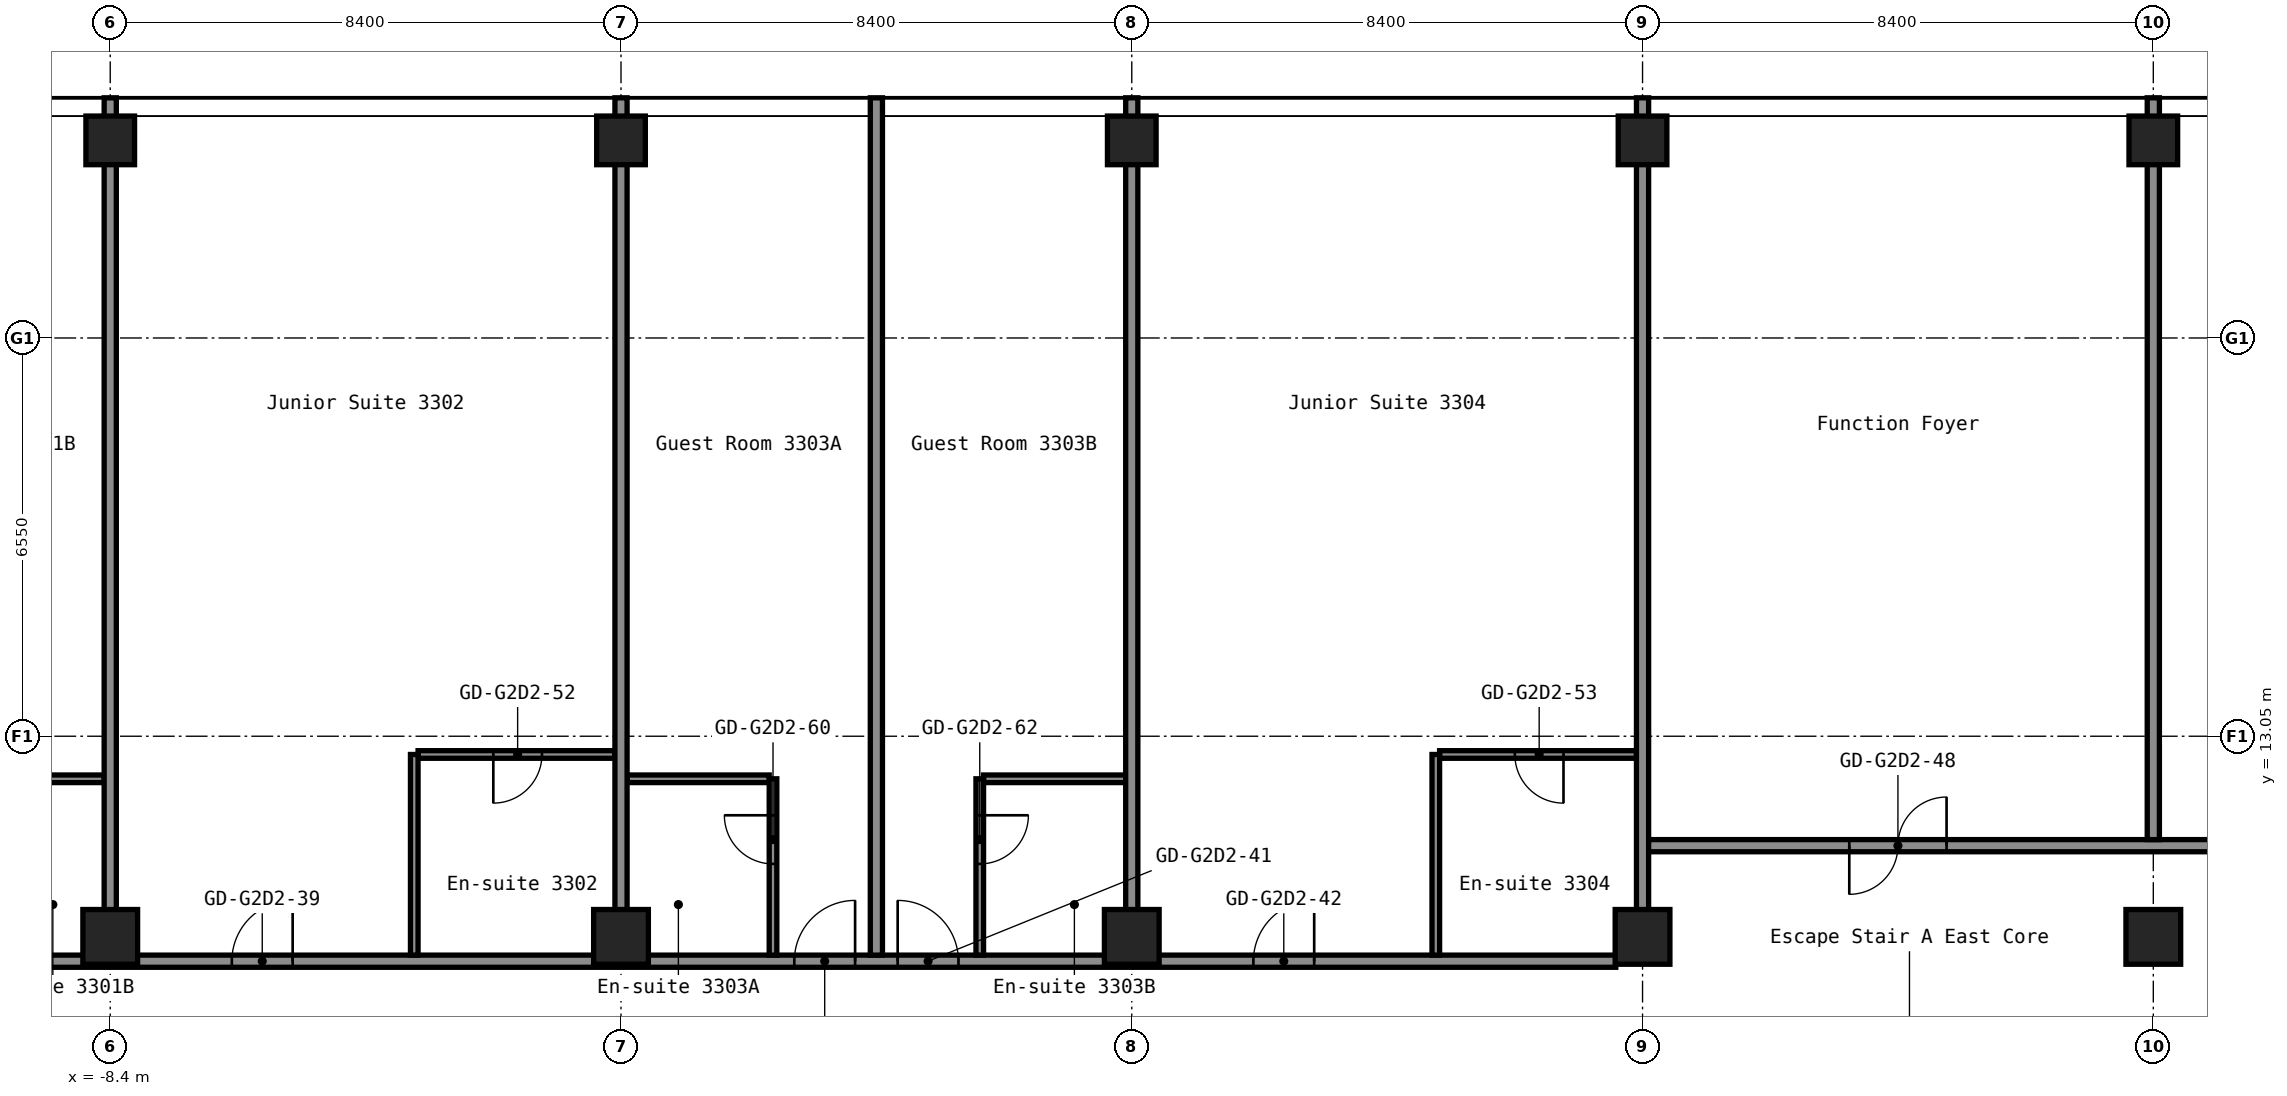
"""IFC4 building model, lengths in metres.
Left out: names, types, materials, properties, quantities, classifications, styles, units other than length and angle.
Written with IfcOpenShell. Run it as: python <this file> out.ifc"""

import sys

from ifc_helpers import new_model, si_unit, direction, frame, frame_2d, origin, origin_2d, place, context, subcontext, project, spatial, rectangle, hollow_rectangle, extrude, element, fill, save


model = new_model("IFC4")
c1 = context("Model", 3, precision=1e-05, world=origin(), true_north=direction((0.0, 1.0)))
c2 = subcontext(c1, "Body", "Model", "MODEL_VIEW")
j1 = project(units=[si_unit("LENGTHUNIT", "METRE"), si_unit("PLANEANGLEUNIT", "RADIAN")], contexts=[c1])
p1 = place(None, origin())
s1 = spatial("IfcSite", under=j1, at=p1, CompositionType="ELEMENT")
p2 = place(p1, origin())
s2 = spatial("IfcBuilding", under=s1, at=p2, CompositionType="ELEMENT")
p3 = place(p2, frame((0.0, 0.0, 117.0)))
s3 = spatial("IfcBuildingStorey", under=s2, at=p3, CompositionType="ELEMENT", Elevation=117.0)
p4 = place(p3, frame((-8.4, 9.75, 0.0), z_axis=(0.0, 0.0, 1.0), x_axis=(1.0, 0.0, 0.0)))
e1 = element("IfcColumn", 1, at=p4, inside=s3, PredefinedType="COLUMN", context=c2, shape_type="SweptSolid", body=[
    extrude(hollow_rectangle(XDim=0.9, YDim=0.9, WallThickness=0.036, at=origin_2d()), origin(), (0.0, 0.0, 1.0), 2.9),
])
p5 = place(p3, frame((-8.4, 22.85, 0.0), z_axis=(0.0, 0.0, 1.0), x_axis=(1.0, 0.0, 0.0)))
e2 = element("IfcColumn", 2, at=p5, inside=s3, PredefinedType="COLUMN", context=c2, shape_type="SweptSolid", body=[
    extrude(hollow_rectangle(XDim=0.8, YDim=0.8, WallThickness=0.032, at=origin_2d()), origin(), (0.0, 0.0, 1.0), 2.9),
])
p6 = place(p3, frame((0.0, 9.75, 0.0), z_axis=(0.0, 0.0, 1.0), x_axis=(1.0, 0.0, 0.0)))
e3 = element("IfcColumn", 3, at=p6, inside=s3, PredefinedType="COLUMN", context=c2, shape_type="SweptSolid", body=[
    extrude(hollow_rectangle(XDim=0.9, YDim=0.9, WallThickness=0.036, at=origin_2d()), origin(), (0.0, 0.0, 1.0), 2.9),
])
p7 = place(p3, frame((0.0, 22.85, 0.0), z_axis=(0.0, 0.0, 1.0), x_axis=(1.0, 0.0, 0.0)))
e4 = element("IfcColumn", 4, at=p7, inside=s3, PredefinedType="COLUMN", context=c2, shape_type="SweptSolid", body=[
    extrude(hollow_rectangle(XDim=0.8, YDim=0.8, WallThickness=0.032, at=origin_2d()), origin(), (0.0, 0.0, 1.0), 2.9),
])
p8 = place(p3, frame((8.4, 9.75, 0.0), z_axis=(0.0, 0.0, 1.0), x_axis=(1.0, 0.0, 0.0)))
e5 = element("IfcColumn", 5, at=p8, inside=s3, PredefinedType="COLUMN", context=c2, shape_type="SweptSolid", body=[
    extrude(hollow_rectangle(XDim=0.9, YDim=0.9, WallThickness=0.036, at=origin_2d()), origin(), (0.0, 0.0, 1.0), 2.9),
])
p9 = place(p3, frame((8.4, 22.85, 0.0), z_axis=(0.0, 0.0, 1.0), x_axis=(1.0, 0.0, 0.0)))
e6 = element("IfcColumn", 6, at=p9, inside=s3, PredefinedType="COLUMN", context=c2, shape_type="SweptSolid", body=[
    extrude(hollow_rectangle(XDim=0.8, YDim=0.8, WallThickness=0.032, at=origin_2d()), origin(), (0.0, 0.0, 1.0), 2.9),
])
p10 = place(p3, frame((16.8, 9.75, 0.0), z_axis=(0.0, 0.0, 1.0), x_axis=(1.0, 0.0, 0.0)))
e7 = element("IfcColumn", 7, at=p10, inside=s3, PredefinedType="COLUMN", context=c2, shape_type="SweptSolid", body=[
    extrude(hollow_rectangle(XDim=0.9, YDim=0.9, WallThickness=0.036, at=origin_2d()), origin(), (0.0, 0.0, 1.0), 2.9),
])
p11 = place(p3, frame((16.8, 22.85, 0.0), z_axis=(0.0, 0.0, 1.0), x_axis=(1.0, 0.0, 0.0)))
e8 = element("IfcColumn", 8, at=p11, inside=s3, PredefinedType="COLUMN", context=c2, shape_type="SweptSolid", body=[
    extrude(hollow_rectangle(XDim=0.8, YDim=0.8, WallThickness=0.032, at=origin_2d()), origin(), (0.0, 0.0, 1.0), 2.9),
])
p12 = place(p3, frame((25.2, 9.75, 0.0), z_axis=(0.0, 0.0, 1.0), x_axis=(1.0, 0.0, 0.0)))
e9 = element("IfcColumn", 9, at=p12, inside=s3, PredefinedType="COLUMN", context=c2, shape_type="SweptSolid", body=[
    extrude(hollow_rectangle(XDim=0.9, YDim=0.9, WallThickness=0.036, at=origin_2d()), origin(), (0.0, 0.0, 1.0), 2.9),
])
p13 = place(p3, frame((25.2, 22.85, 0.0), z_axis=(0.0, 0.0, 1.0), x_axis=(1.0, 0.0, 0.0)))
e10 = element("IfcColumn", 10, at=p13, inside=s3, PredefinedType="COLUMN", context=c2, shape_type="SweptSolid", body=[
    extrude(hollow_rectangle(XDim=0.8, YDim=0.8, WallThickness=0.032, at=origin_2d()), origin(), (0.0, 0.0, 1.0), 2.9),
])
p14 = place(p3, frame((-16.36, 9.35, 0.0), z_axis=(0.0, 0.0, 1.0), x_axis=(1.0, 0.0, 0.0)))
e11 = element("IfcWall", 11, at=p14, inside=s3, PredefinedType="PARTITIONING", context=c2, shape_type="SweptSolid", body=[
    extrude(rectangle(XDim=32.72, YDim=0.2, at=frame_2d((16.36, 0.0))), origin(), (0.0, 0.0, 1.0), 2.9),
])
p15 = place(p14, frame((2.41, 0.0, 0.0)))
e12 = element("IfcOpeningElement", 12, at=p15, cuts=e11, PredefinedType="OPENING", context=c2, shape_type="SweptSolid", body=[
    extrude(rectangle(XDim=1.0, YDim=2.1, at=frame_2d((0.5, 1.05))), frame((0.0, 0.11, 0.0), z_axis=(0.0, -1.0, 0.0), x_axis=(1.0, 0.0, 0.0)), (0.0, 0.0, 1.0), 0.22),
])
p16 = place(p14, frame((4.11, 0.0, 0.0)))
e13 = element("IfcOpeningElement", 13, at=p16, cuts=e11, PredefinedType="OPENING", context=c2, shape_type="SweptSolid", body=[
    extrude(rectangle(XDim=1.0, YDim=2.1, at=frame_2d((0.5, 1.05))), frame((0.0, 0.11, 0.0), z_axis=(0.0, -1.0, 0.0), x_axis=(1.0, 0.0, 0.0)), (0.0, 0.0, 1.0), 0.22),
])
p17 = place(p14, frame((9.96, 0.0, 0.0)))
e14 = element("IfcOpeningElement", 14, at=p17, cuts=e11, PredefinedType="OPENING", context=c2, shape_type="SweptSolid", body=[
    extrude(rectangle(XDim=1.0, YDim=2.1, at=frame_2d((0.5, 1.05))), frame((0.0, 0.11, 0.0), z_axis=(0.0, -1.0, 0.0), x_axis=(1.0, 0.0, 0.0)), (0.0, 0.0, 1.0), 0.22),
])
p18 = place(p14, frame((19.21, 0.0, 0.0)))
e15 = element("IfcOpeningElement", 15, at=p18, cuts=e11, PredefinedType="OPENING", context=c2, shape_type="SweptSolid", body=[
    extrude(rectangle(XDim=1.0, YDim=2.1, at=frame_2d((0.5, 1.05))), frame((0.0, 0.11, 0.0), z_axis=(0.0, -1.0, 0.0), x_axis=(1.0, 0.0, 0.0)), (0.0, 0.0, 1.0), 0.22),
])
p19 = place(p14, frame((20.91, 0.0, 0.0)))
e16 = element("IfcOpeningElement", 16, at=p19, cuts=e11, PredefinedType="OPENING", context=c2, shape_type="SweptSolid", body=[
    extrude(rectangle(XDim=1.0, YDim=2.1, at=frame_2d((0.5, 1.05))), frame((0.0, 0.11, 0.0), z_axis=(0.0, -1.0, 0.0), x_axis=(1.0, 0.0, 0.0)), (0.0, 0.0, 1.0), 0.22),
])
p20 = place(p14, frame((26.76, 0.0, 0.0)))
e17 = element("IfcOpeningElement", 17, at=p20, cuts=e11, PredefinedType="OPENING", context=c2, shape_type="SweptSolid", body=[
    extrude(rectangle(XDim=1.0, YDim=2.1, at=frame_2d((0.5, 1.05))), frame((0.0, 0.11, 0.0), z_axis=(0.0, -1.0, 0.0), x_axis=(1.0, 0.0, 0.0)), (0.0, 0.0, 1.0), 0.22),
])
p21 = place(p3, frame((16.8, 11.25, 0.0), z_axis=(0.0, 0.0, 1.0), x_axis=(1.0, 0.0, 0.0)))
e18 = element("IfcWall", 18, at=p21, inside=s3, PredefinedType="PARTITIONING", context=c2, shape_type="SweptSolid", body=[
    extrude(rectangle(XDim=29.7, YDim=0.2, at=frame_2d((14.85, 0.0))), origin(), (0.0, 0.0, 1.0), 2.9),
])
p22 = place(p21, frame((3.4, 0.0, 0.0)))
e19 = element("IfcOpeningElement", 19, at=p22, cuts=e18, PredefinedType="OPENING", context=c2, shape_type="SweptSolid", body=[
    extrude(rectangle(XDim=1.6, YDim=2.1, at=frame_2d((0.8, 1.05))), frame((0.0, 0.11, 0.0), z_axis=(0.0, -1.0, 0.0), x_axis=(1.0, 0.0, 0.0)), (0.0, 0.0, 1.0), 0.22),
])
p23 = place(p21, frame((11.8, 0.0, 0.0)))
e20 = element("IfcOpeningElement", 20, at=p23, cuts=e18, PredefinedType="OPENING", context=c2, shape_type="SweptSolid", body=[
    extrude(rectangle(XDim=1.6, YDim=2.1, at=frame_2d((0.8, 1.05))), frame((0.0, 0.11, 0.0), z_axis=(0.0, -1.0, 0.0), x_axis=(1.0, 0.0, 0.0)), (0.0, 0.0, 1.0), 0.22),
])
p24 = place(p21, frame((20.2, 0.0, 0.0)))
e21 = element("IfcOpeningElement", 21, at=p24, cuts=e18, PredefinedType="OPENING", context=c2, shape_type="SweptSolid", body=[
    extrude(rectangle(XDim=1.6, YDim=2.1, at=frame_2d((0.8, 1.05))), frame((0.0, 0.11, 0.0), z_axis=(0.0, -1.0, 0.0), x_axis=(1.0, 0.0, 0.0)), (0.0, 0.0, 1.0), 0.22),
])
p25 = place(p21, frame((26.85, 0.0, 0.0)))
e22 = element("IfcOpeningElement", 22, at=p25, cuts=e18, PredefinedType="OPENING", context=c2, shape_type="SweptSolid", body=[
    extrude(rectangle(XDim=0.9, YDim=2.1, at=frame_2d((0.45, 1.05))), frame((0.0, 0.11, 0.0), z_axis=(0.0, -1.0, 0.0), x_axis=(1.0, 0.0, 0.0)), (0.0, 0.0, 1.0), 0.22),
])
for number, where, z_axis, x_axis in (
    (23, (-10.837, 12.35, 0.0), (0.0, 0.0, 1.0), (1.0, 0.0, 0.0)),
    (24, (0.1, 12.35, 0.0), (0.0, 0.0, 1.0), (1.0, 0.0, 0.0)),
):
    element("IfcWall", number, at=place(p3, frame(where, z_axis=z_axis, x_axis=x_axis)), inside=s3, PredefinedType="PARTITIONING", context=c2, shape_type="SweptSolid", body=[
        extrude(rectangle(XDim=2.337, YDim=0.125, at=frame_2d((1.169, 0.0))), origin(), (0.0, 0.0, 1.0), 2.9),
    ])
p26 = place(p3, frame((5.962, 12.35, 0.0), z_axis=(0.0, 0.0, 1.0), x_axis=(1.0, 0.0, 0.0)))
e25 = element("IfcWall", 25, at=p26, inside=s3, PredefinedType="PARTITIONING", context=c2, shape_type="SweptSolid", body=[
    extrude(rectangle(XDim=2.338, YDim=0.125, at=frame_2d((1.169, 0.0))), origin(), (0.0, 0.0, 1.0), 2.9),
])
p27 = place(p3, frame((-3.337, 12.75, 0.0), z_axis=(0.0, 0.0, 1.0), x_axis=(1.0, 0.0, 0.0)))
e26 = element("IfcWall", 26, at=p27, inside=s3, PredefinedType="PARTITIONING", context=c2, shape_type="SweptSolid", body=[
    extrude(rectangle(XDim=3.237, YDim=0.125, at=frame_2d((1.619, 0.0))), origin(), (0.0, 0.0, 1.0), 2.9),
])
p28 = place(p27, frame((1.238, 0.0, 0.0)))
e27 = element("IfcOpeningElement", 27, at=p28, cuts=e26, PredefinedType="OPENING", context=c2, shape_type="SweptSolid", body=[
    extrude(rectangle(XDim=0.8, YDim=2.1, at=frame_2d((0.4, 1.05))), frame((0.0, 0.073, 0.0), z_axis=(0.0, -1.0, 0.0), x_axis=(1.0, 0.0, 0.0)), (0.0, 0.0, 1.0), 0.145),
])
p29 = place(p3, frame((13.462, 12.75, 0.0), z_axis=(0.0, 0.0, 1.0), x_axis=(1.0, 0.0, 0.0)))
e28 = element("IfcWall", 28, at=p29, inside=s3, PredefinedType="PARTITIONING", context=c2, shape_type="SweptSolid", body=[
    extrude(rectangle(XDim=3.238, YDim=0.125, at=frame_2d((1.619, 0.0))), origin(), (0.0, 0.0, 1.0), 2.9),
])
p30 = place(p29, frame((1.238, 0.0, 0.0)))
e29 = element("IfcOpeningElement", 29, at=p30, cuts=e28, PredefinedType="OPENING", context=c2, shape_type="SweptSolid", body=[
    extrude(rectangle(XDim=0.8, YDim=2.1, at=frame_2d((0.4, 1.05))), frame((0.0, 0.073, 0.0), z_axis=(0.0, -1.0, 0.0), x_axis=(1.0, 0.0, 0.0)), (0.0, 0.0, 1.0), 0.145),
])
p31 = place(p3, frame((-8.4, 10.19, 0.0), z_axis=(0.0, 0.0, 1.0), x_axis=(0.0, 1.0, 0.0)))
e30 = element("IfcWall", 30, at=p31, inside=s3, PredefinedType="PARTITIONING", context=c2, shape_type="SweptSolid", body=[
    extrude(rectangle(XDim=13.36, YDim=0.2, at=frame_2d((6.68, 0.0))), origin(), (0.0, 0.0, 1.0), 2.9),
])
p32 = place(p3, frame((-3.4, 9.45, 0.0), z_axis=(0.0, 0.0, 1.0), x_axis=(0.0, 1.0, 0.0)))
e31 = element("IfcWall", 31, at=p32, inside=s3, PredefinedType="PARTITIONING", context=c2, shape_type="SweptSolid", body=[
    extrude(rectangle(XDim=3.3, YDim=0.125, at=frame_2d((1.65, 0.0))), origin(), (0.0, 0.0, 1.0), 2.9),
])
p33 = place(p3, frame((0.0, 10.19, 0.0), z_axis=(0.0, 0.0, 1.0), x_axis=(0.0, 1.0, 0.0)))
e32 = element("IfcWall", 32, at=p33, inside=s3, PredefinedType="PARTITIONING", context=c2, shape_type="SweptSolid", body=[
    extrude(rectangle(XDim=13.36, YDim=0.2, at=frame_2d((6.68, 0.0))), origin(), (0.0, 0.0, 1.0), 2.9),
])
p34 = place(p3, frame((2.5, 9.45, 0.0), z_axis=(0.0, 0.0, 1.0), x_axis=(0.0, 1.0, 0.0)))
e33 = element("IfcWall", 33, at=p34, inside=s3, PredefinedType="PARTITIONING", context=c2, shape_type="SweptSolid", body=[
    extrude(rectangle(XDim=2.9, YDim=0.125, at=frame_2d((1.45, 0.0))), origin(), (0.0, 0.0, 1.0), 2.9),
])
p35 = place(p34, frame((1.5, 0.0, 0.0)))
e34 = element("IfcOpeningElement", 34, at=p35, cuts=e33, PredefinedType="OPENING", context=c2, shape_type="SweptSolid", body=[
    extrude(rectangle(XDim=0.8, YDim=2.1, at=frame_2d((0.4, 1.05))), frame((0.0, 0.073, 0.0), z_axis=(0.0, -1.0, 0.0), x_axis=(1.0, 0.0, 0.0)), (0.0, 0.0, 1.0), 0.145),
])
p36 = place(p3, frame((4.2, 9.45, 0.0), z_axis=(0.0, 0.0, 1.0), x_axis=(0.0, 1.0, 0.0)))
e35 = element("IfcWall", 35, at=p36, inside=s3, PredefinedType="PARTITIONING", context=c2, shape_type="SweptSolid", body=[
    extrude(rectangle(XDim=14.1, YDim=0.2, at=frame_2d((7.05, 0.0))), origin(), (0.0, 0.0, 1.0), 2.9),
])
p37 = place(p3, frame((5.9, 9.45, 0.0), z_axis=(0.0, 0.0, 1.0), x_axis=(0.0, 1.0, 0.0)))
e36 = element("IfcWall", 36, at=p37, inside=s3, PredefinedType="PARTITIONING", context=c2, shape_type="SweptSolid", body=[
    extrude(rectangle(XDim=2.9, YDim=0.125, at=frame_2d((1.45, 0.0))), origin(), (0.0, 0.0, 1.0), 2.9),
])
p38 = place(p37, frame((1.5, 0.0, 0.0)))
e37 = element("IfcOpeningElement", 37, at=p38, cuts=e36, PredefinedType="OPENING", context=c2, shape_type="SweptSolid", body=[
    extrude(rectangle(XDim=0.8, YDim=2.1, at=frame_2d((0.4, 1.05))), frame((0.0, 0.073, 0.0), z_axis=(0.0, -1.0, 0.0), x_axis=(1.0, 0.0, 0.0)), (0.0, 0.0, 1.0), 0.145),
])
p39 = place(p3, frame((8.4, 10.19, 0.0), z_axis=(0.0, 0.0, 1.0), x_axis=(0.0, 1.0, 0.0)))
e38 = element("IfcWall", 38, at=p39, inside=s3, PredefinedType="PARTITIONING", context=c2, shape_type="SweptSolid", body=[
    extrude(rectangle(XDim=13.36, YDim=0.2, at=frame_2d((6.68, 0.0))), origin(), (0.0, 0.0, 1.0), 2.9),
])
p40 = place(p3, frame((13.4, 9.45, 0.0), z_axis=(0.0, 0.0, 1.0), x_axis=(0.0, 1.0, 0.0)))
e39 = element("IfcWall", 39, at=p40, inside=s3, PredefinedType="PARTITIONING", context=c2, shape_type="SweptSolid", body=[
    extrude(rectangle(XDim=3.3, YDim=0.125, at=frame_2d((1.65, 0.0))), origin(), (0.0, 0.0, 1.0), 2.9),
])
p41 = place(p3, frame((16.8, 10.19, 0.0), z_axis=(0.0, 0.0, 1.0), x_axis=(0.0, 1.0, 0.0)))
e40 = element("IfcWall", 40, at=p41, inside=s3, PredefinedType="PARTITIONING", context=c2, shape_type="SweptSolid", body=[
    extrude(rectangle(XDim=13.36, YDim=0.2, at=frame_2d((6.68, 0.0))), origin(), (0.0, 0.0, 1.0), 2.9),
])
p42 = place(p3, frame((25.2, 11.35, 0.0), z_axis=(0.0, 0.0, 1.0), x_axis=(0.0, 1.0, 0.0)))
e41 = element("IfcWall", 41, at=p42, inside=s3, PredefinedType="PARTITIONING", context=c2, shape_type="SweptSolid", body=[
    extrude(rectangle(XDim=12.2, YDim=0.2, at=frame_2d((6.1, 0.0))), origin(), (0.0, 0.0, 1.0), 2.9),
])
p43 = place(p17, origin())
e42 = element("IfcDoor", 42, at=p43, inside=s3, OperationType="SINGLE_SWING_LEFT", PredefinedType="DOOR", context=c2, shape_type="SweptSolid", body=[
    extrude(rectangle(XDim=1.0, YDim=2.1, at=frame_2d((0.5, 1.05))), frame((0.0, 0.025, 0.0), z_axis=(0.0, -1.0, 0.0), x_axis=(1.0, 0.0, 0.0)), (0.0, 0.0, 1.0), 0.05),
])
fill(e14, e42)
p44 = place(p18, origin())
e43 = element("IfcDoor", 43, at=p44, inside=s3, OperationType="SINGLE_SWING_LEFT", PredefinedType="DOOR", context=c2, shape_type="SweptSolid", body=[
    extrude(rectangle(XDim=1.0, YDim=2.1, at=frame_2d((0.5, 1.05))), frame((0.0, 0.025, 0.0), z_axis=(0.0, -1.0, 0.0), x_axis=(1.0, 0.0, 0.0)), (0.0, 0.0, 1.0), 0.05),
])
fill(e15, e43)
p45 = place(p19, origin())
e44 = element("IfcDoor", 44, at=p45, inside=s3, OperationType="SINGLE_SWING_RIGHT", PredefinedType="DOOR", context=c2, shape_type="SweptSolid", body=[
    extrude(rectangle(XDim=1.0, YDim=2.1, at=frame_2d((0.5, 1.05))), frame((0.0, 0.025, 0.0), z_axis=(0.0, -1.0, 0.0), x_axis=(1.0, 0.0, 0.0)), (0.0, 0.0, 1.0), 0.05),
])
fill(e16, e44)
p46 = place(p20, origin())
e45 = element("IfcDoor", 45, at=p46, inside=s3, OperationType="SINGLE_SWING_LEFT", PredefinedType="DOOR", context=c2, shape_type="SweptSolid", body=[
    extrude(rectangle(XDim=1.0, YDim=2.1, at=frame_2d((0.5, 1.05))), frame((0.0, 0.025, 0.0), z_axis=(0.0, -1.0, 0.0), x_axis=(1.0, 0.0, 0.0)), (0.0, 0.0, 1.0), 0.05),
])
fill(e17, e45)
p47 = place(p22, origin())
e46 = element("IfcDoor", 46, at=p47, inside=s3, OperationType="DOUBLE_DOOR_SINGLE_SWING", PredefinedType="DOOR", context=c2, shape_type="SweptSolid", body=[
    extrude(rectangle(XDim=1.6, YDim=2.1, at=frame_2d((0.8, 1.05))), frame((0.0, 0.025, 0.0), z_axis=(0.0, -1.0, 0.0), x_axis=(1.0, 0.0, 0.0)), (0.0, 0.0, 1.0), 0.05),
])
fill(e19, e46)
p48 = place(p28, origin())
e47 = element("IfcDoor", 47, at=p48, inside=s3, OperationType="SINGLE_SWING_LEFT", PredefinedType="DOOR", context=c2, shape_type="SweptSolid", body=[
    extrude(rectangle(XDim=0.8, YDim=2.1, at=frame_2d((0.4, 1.05))), frame((0.0, 0.025, 0.0), z_axis=(0.0, -1.0, 0.0), x_axis=(1.0, 0.0, 0.0)), (0.0, 0.0, 1.0), 0.05),
])
fill(e27, e47)
p49 = place(p30, origin())
e48 = element("IfcDoor", 48, at=p49, inside=s3, OperationType="SINGLE_SWING_RIGHT", PredefinedType="DOOR", context=c2, shape_type="SweptSolid", body=[
    extrude(rectangle(XDim=0.8, YDim=2.1, at=frame_2d((0.4, 1.05))), frame((0.0, 0.025, 0.0), z_axis=(0.0, -1.0, 0.0), x_axis=(1.0, 0.0, 0.0)), (0.0, 0.0, 1.0), 0.05),
])
fill(e29, e48)
p50 = place(p35, origin())
e49 = element("IfcDoor", 49, at=p50, inside=s3, OperationType="SINGLE_SWING_LEFT", PredefinedType="DOOR", context=c2, shape_type="SweptSolid", body=[
    extrude(rectangle(XDim=0.8, YDim=2.1, at=frame_2d((0.4, 1.05))), frame((0.0, 0.025, 0.0), z_axis=(0.0, -1.0, 0.0), x_axis=(1.0, 0.0, 0.0)), (0.0, 0.0, 1.0), 0.05),
])
fill(e34, e49)
p51 = place(p38, origin())
e50 = element("IfcDoor", 50, at=p51, inside=s3, OperationType="SINGLE_SWING_RIGHT", PredefinedType="DOOR", context=c2, shape_type="SweptSolid", body=[
    extrude(rectangle(XDim=0.8, YDim=2.1, at=frame_2d((0.4, 1.05))), frame((0.0, 0.025, 0.0), z_axis=(0.0, -1.0, 0.0), x_axis=(1.0, 0.0, 0.0)), (0.0, 0.0, 1.0), 0.05),
])
fill(e37, e50)
save(model, sys.argv[1])
